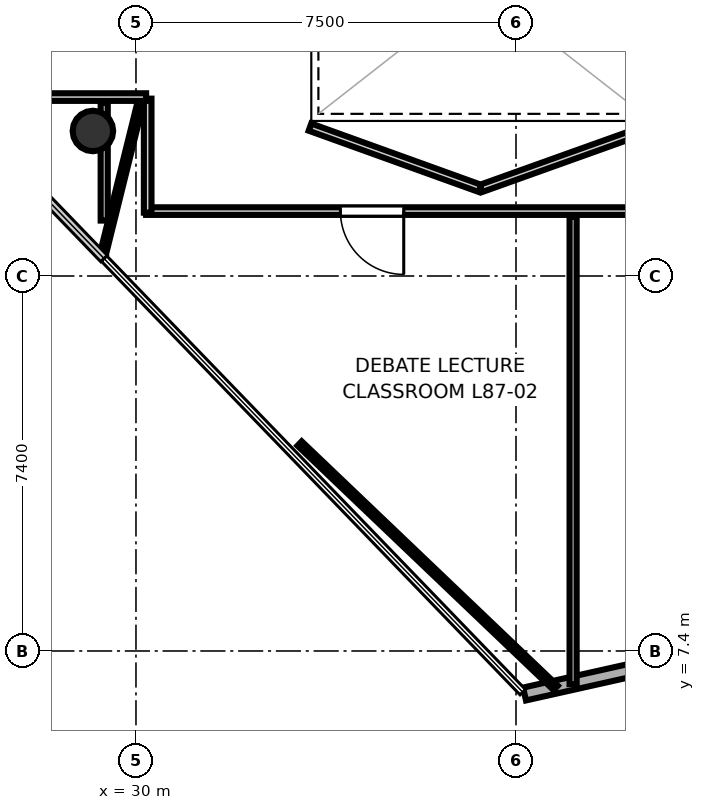
"""IFC4 building model, lengths in metres.
Left out: names, types, materials, properties, quantities, classifications, styles, units other than length and angle.
Written with IfcOpenShell. Run it as: python <this file> out.ifc"""

import sys

from ifc_helpers import new_model, si_unit, direction, frame, frame_2d, origin, origin_2d, place, context, subcontext, project, spatial, rectangle, hollow_circle, extrude, element, fill, save


model = new_model("IFC4")
c1 = context("Model", 3, precision=1e-05, world=origin(), true_north=direction((0.0, 1.0)))
c2 = subcontext(c1, "Body", "Model", "MODEL_VIEW")
j1 = project(units=[si_unit("LENGTHUNIT", "METRE"), si_unit("PLANEANGLEUNIT", "RADIAN")], contexts=[c1])
p1 = place(None, origin())
s1 = spatial("IfcSite", under=j1, at=p1, CompositionType="ELEMENT")
p2 = place(p1, origin())
s2 = spatial("IfcBuilding", under=s1, at=p2, CompositionType="ELEMENT")
p3 = place(p2, frame((0.0, 0.0, 337.0)))
s3 = spatial("IfcBuildingStorey", under=s2, at=p3, CompositionType="ELEMENT", Elevation=337.0)
p4 = place(p3, frame((29.15, 17.662, 0.0), z_axis=(0.0, 0.0, 1.0), x_axis=(1.0, 0.0, 0.0)))
e1 = element("IfcColumn", 1, at=p4, inside=s3, PredefinedType="COLUMN", context=c2, shape_type="SweptSolid", body=[
    extrude(hollow_circle(Radius=0.4, WallThickness=0.022, at=origin_2d()), origin(), (0.0, 0.0, 1.0), 3.7),
])
p5 = place(p3, frame((37.668, 6.551, 0.0), z_axis=(0.0, 0.0, 1.0), x_axis=(0.975867618007, 0.218362982496, 0.0)))
e2 = element("IfcWall", 2, at=p5, inside=s3, PredefinedType="SOLIDWALL", context=c2, shape_type="SweptSolid", body=[
    extrude(rectangle(XDim=3.681, YDim=0.26, at=frame_2d((1.84, 0.0))), origin(), (0.0, 0.0, 1.0), 3.52),
])
p6 = place(p3, frame((33.434, 17.738, 0.0), z_axis=(0.0, 0.0, 1.0), x_axis=(0.940782662834, -0.339010296764, 0.0)))
e3 = element("IfcWall", 3, at=p6, inside=s3, PredefinedType="PARTITIONING", context=c2, shape_type="SweptSolid", body=[
    extrude(rectangle(XDim=3.567, YDim=0.15, at=frame_2d((1.783, 0.0))), origin(), (0.0, 0.0, 1.0), 2.84),
])
p7 = place(p3, frame((36.81, 16.529, 0.0), z_axis=(0.0, 0.0, 1.0), x_axis=(0.941548344365, 0.33687789364, 0.0)))
e4 = element("IfcWall", 4, at=p7, inside=s3, PredefinedType="PARTITIONING", context=c2, shape_type="SweptSolid", body=[
    extrude(rectangle(XDim=3.513, YDim=0.15, at=frame_2d((1.756, 0.0))), origin(), (0.0, 0.0, 1.0), 2.84),
])
p8 = place(p3, frame((42.65, 16.081, 0.0), z_axis=(0.0, 0.0, 1.0), x_axis=(-1.0, 0.0, 0.0)))
e5 = element("IfcWall", 5, at=p8, inside=s3, PredefinedType="PARTITIONING", context=c2, shape_type="SweptSolid", body=[
    extrude(rectangle(XDim=12.45, YDim=0.15, at=frame_2d((6.225, 0.0))), origin(), (0.0, 0.0, 1.0), 2.84),
])
p9 = place(p8, frame((7.365, 0.0, 0.0)))
e6 = element("IfcOpeningElement", 6, at=p9, cuts=e5, PredefinedType="OPENING", context=c2, shape_type="SweptSolid", body=[
    extrude(rectangle(XDim=1.25, YDim=2.2, at=frame_2d((0.625, 1.1))), frame((0.0, 0.085, 0.0), z_axis=(0.0, -1.0, 0.0), x_axis=(1.0, 0.0, 0.0)), (0.0, 0.0, 1.0), 0.17),
])
p10 = place(p3, frame((30.231, 16.05, 0.0), z_axis=(0.0, 0.0, 1.0), x_axis=(0.0, 1.0, 0.0)))
e7 = element("IfcWall", 7, at=p10, inside=s3, PredefinedType="PARTITIONING", context=c2, shape_type="SweptSolid", body=[
    extrude(rectangle(XDim=2.25, YDim=0.15, at=frame_2d((1.125, 0.0))), origin(), (0.0, 0.0, 1.0), 2.84),
])
p11 = place(p3, frame((30.2, 18.331, 0.0), z_axis=(0.0, 0.0, 1.0), x_axis=(-1.0, 0.0, 0.0)))
e8 = element("IfcWall", 8, at=p11, inside=s3, PredefinedType="PARTITIONING", context=c2, shape_type="SweptSolid", body=[
    extrude(rectangle(XDim=3.927, YDim=0.15, at=frame_2d((1.964, 0.0))), origin(), (0.0, 0.0, 1.0), 2.84),
])
p12 = place(p3, frame((29.373, 15.894, 0.0), z_axis=(0.0, 0.0, 1.0), x_axis=(0.0, 1.0, 0.0)))
e9 = element("IfcWall", 9, at=p12, inside=s3, PredefinedType="PARTITIONING", context=c2, shape_type="SweptSolid", body=[
    extrude(rectangle(XDim=2.326, YDim=0.14, at=frame_2d((1.163, 0.0))), origin(), (0.0, 0.0, 1.0), 2.84),
])
p13 = place(p3, frame((30.089, 18.219, 0.0), z_axis=(0.0, 0.0, 1.0), x_axis=(-0.240810448815, -0.970572165139, 0.0)))
e10 = element("IfcWall", 10, at=p13, inside=s3, PredefinedType="PARTITIONING", context=c2, shape_type="SweptSolid", body=[
    extrude(rectangle(XDim=3.131, YDim=0.12, at=frame_2d((1.565, 0.0))), origin(), (0.0, 0.0, 1.0), 2.84),
])
p14 = place(p3, frame((38.627, 15.97, 0.0), z_axis=(0.0, 0.0, 1.0), x_axis=(0.0, -1.0, 0.0)))
e11 = element("IfcWall", 11, at=p14, inside=s3, PredefinedType="PARTITIONING", context=c2, shape_type="SweptSolid", body=[
    extrude(rectangle(XDim=9.224, YDim=0.14, at=frame_2d((4.612, 0.0))), origin(), (0.0, 0.0, 1.0), 2.84),
])
p15 = place(p3, frame((38.284, 6.671, 0.0), z_axis=(0.0, 0.0, 1.0), x_axis=(-0.723527675696, 0.690295373374, 0.0)))
e12 = element("IfcWall", 12, at=p15, inside=s3, PredefinedType="PARTITIONING", context=c2, shape_type="SweptSolid", body=[
    extrude(rectangle(XDim=6.987, YDim=0.12, at=frame_2d((3.493, 0.0))), origin(), (0.0, 0.0, 1.0), 2.84),
])
p16 = place(p9, origin())
e13 = element("IfcDoor", 13, at=p16, inside=s3, OperationType="SINGLE_SWING_LEFT", PredefinedType="DOOR", context=c2, shape_type="SweptSolid", body=[
    extrude(rectangle(XDim=1.25, YDim=2.2, at=frame_2d((0.625, 1.1))), frame((0.0, 0.025, 0.0), z_axis=(0.0, -1.0, 0.0), x_axis=(1.0, 0.0, 0.0)), (0.0, 0.0, 1.0), 0.05),
])
fill(e6, e13)
save(model, sys.argv[1])
